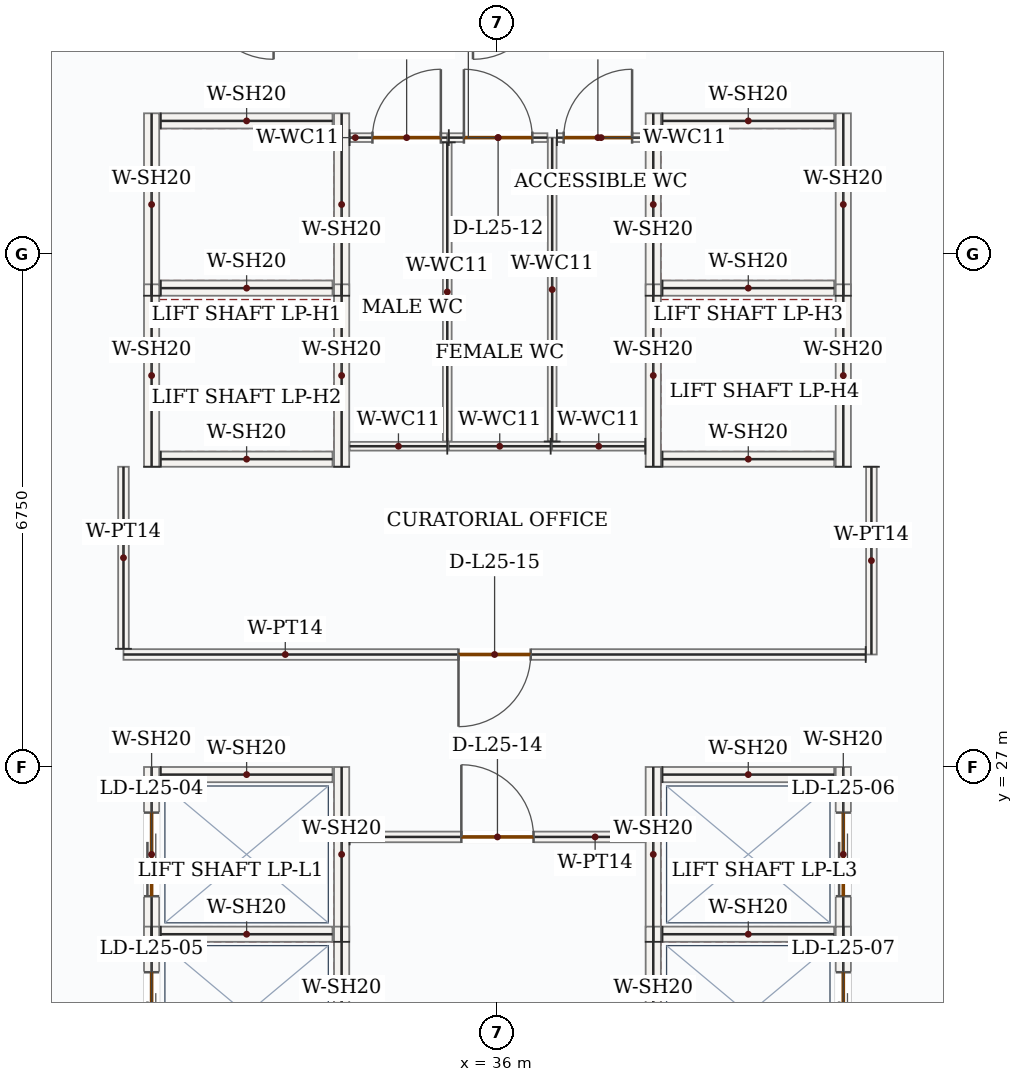
"""IFC4 building model, lengths in metres.
Left out: names, types, materials, properties, quantities, classifications, styles, units other than length and angle.
Written with IfcOpenShell. Run it as: python <this file> out.ifc"""

import sys

from ifc_helpers import new_model, si_unit, direction, frame, frame_2d, origin, place, context, subcontext, project, spatial, rectangle, extrude, source, transform, mapped, element, fill, save


model = new_model("IFC4")
c1 = context("Model", 3, precision=1e-05, world=origin(), true_north=direction((0.0, 1.0)))
c2 = subcontext(c1, "Body", "Model", "MODEL_VIEW")
j1 = project(units=[si_unit("LENGTHUNIT", "METRE"), si_unit("PLANEANGLEUNIT", "RADIAN")], contexts=[c1])
p1 = place(None, origin())
s1 = spatial("IfcSite", under=j1, at=p1, CompositionType="ELEMENT")
p2 = place(p1, origin())
s2 = spatial("IfcBuilding", under=s1, at=p2, CompositionType="ELEMENT")
p3 = place(p2, frame((0.0, 0.0, 113.1)))
s3 = spatial("IfcBuildingStorey", under=s2, at=p3, CompositionType="ELEMENT", Elevation=113.1)
m1 = source(origin(), c2, "Body", "SweptSolid", [
    extrude(rectangle(XDim=2.4, YDim=0.2, at=frame_2d((1.2, 0.0))), origin(), (0.0, 0.0, 1.0), 3.95),
])
for number, where, z_axis, x_axis in (
    (1, (31.45, 33.2, 0.0), (0.0, 0.0, 1.0), (0.0, 1.0, 0.0)),
    (2, (33.95, 33.2, 0.0), (0.0, 0.0, 1.0), (0.0, 1.0, 0.0)),
):
    element("IfcWall", number, at=place(p3, frame(where, z_axis=z_axis, x_axis=x_axis)), inside=s3, PredefinedType="SOLIDWALL", context=c2, shape_type="MappedRepresentation", body=[
        mapped(m1, transform((0.0, 0.0, 0.0), x_axis=(1.0, 0.0, 0.0), y_axis=(0.0, 1.0, 0.0), z_axis=(0.0, 0.0, 1.0), scale=1.0)),
    ])
m2 = source(origin(), c2, "Body", "SweptSolid", [
    extrude(rectangle(XDim=2.26, YDim=0.2, at=frame_2d((1.13, 0.0))), origin(), (0.0, 0.0, 1.0), 3.95),
])
for number, where, z_axis, x_axis in (
    (3, (31.57, 33.3, 0.0), (0.0, 0.0, 1.0), (1.0, 0.0, 0.0)),
    (4, (31.57, 35.5, 0.0), (0.0, 0.0, 1.0), (1.0, 0.0, 0.0)),
):
    element("IfcWall", number, at=place(p3, frame(where, z_axis=z_axis, x_axis=x_axis)), inside=s3, PredefinedType="SOLIDWALL", context=c2, shape_type="MappedRepresentation", body=[
        mapped(m2, transform((0.0, 0.0, 0.0), x_axis=(1.0, 0.0, 0.0), y_axis=(0.0, 1.0, 0.0), z_axis=(0.0, 0.0, 1.0), scale=1.0)),
    ])
for number, where, z_axis, x_axis in (
    (5, (31.45, 30.95, 0.0), (0.0, 0.0, 1.0), (0.0, 1.0, 0.0)),
    (6, (33.95, 30.95, 0.0), (0.0, 0.0, 1.0), (0.0, 1.0, 0.0)),
):
    element("IfcWall", number, at=place(p3, frame(where, z_axis=z_axis, x_axis=x_axis)), inside=s3, PredefinedType="SOLIDWALL", context=c2, shape_type="MappedRepresentation", body=[
        mapped(m1, transform((0.0, 0.0, 0.0), x_axis=(1.0, 0.0, 0.0), y_axis=(0.0, 1.0, 0.0), z_axis=(0.0, 0.0, 1.0), scale=1.0)),
    ])
p4 = place(p3, frame((31.57, 31.05, 0.0), z_axis=(0.0, 0.0, 1.0), x_axis=(1.0, 0.0, 0.0)))
e7 = element("IfcWall", 7, at=p4, inside=s3, PredefinedType="SOLIDWALL", context=c2, shape_type="MappedRepresentation", body=[
    mapped(m2, transform((0.0, 0.0, 0.0), x_axis=(1.0, 0.0, 0.0), y_axis=(0.0, 1.0, 0.0), z_axis=(0.0, 0.0, 1.0), scale=1.0)),
])
for number, where, z_axis, x_axis in (
    (8, (38.05, 33.2, 0.0), (0.0, 0.0, 1.0), (0.0, 1.0, 0.0)),
    (9, (40.55, 33.2, 0.0), (0.0, 0.0, 1.0), (0.0, 1.0, 0.0)),
):
    element("IfcWall", number, at=place(p3, frame(where, z_axis=z_axis, x_axis=x_axis)), inside=s3, PredefinedType="SOLIDWALL", context=c2, shape_type="MappedRepresentation", body=[
        mapped(m1, transform((0.0, 0.0, 0.0), x_axis=(1.0, 0.0, 0.0), y_axis=(0.0, 1.0, 0.0), z_axis=(0.0, 0.0, 1.0), scale=1.0)),
    ])
for number, where, z_axis, x_axis in (
    (10, (38.17, 33.3, 0.0), (0.0, 0.0, 1.0), (1.0, 0.0, 0.0)),
    (11, (38.17, 35.5, 0.0), (0.0, 0.0, 1.0), (1.0, 0.0, 0.0)),
):
    element("IfcWall", number, at=place(p3, frame(where, z_axis=z_axis, x_axis=x_axis)), inside=s3, PredefinedType="SOLIDWALL", context=c2, shape_type="MappedRepresentation", body=[
        mapped(m2, transform((0.0, 0.0, 0.0), x_axis=(1.0, 0.0, 0.0), y_axis=(0.0, 1.0, 0.0), z_axis=(0.0, 0.0, 1.0), scale=1.0)),
    ])
for number, where, z_axis, x_axis in (
    (12, (38.05, 30.95, 0.0), (0.0, 0.0, 1.0), (0.0, 1.0, 0.0)),
    (13, (40.55, 30.95, 0.0), (0.0, 0.0, 1.0), (0.0, 1.0, 0.0)),
):
    element("IfcWall", number, at=place(p3, frame(where, z_axis=z_axis, x_axis=x_axis)), inside=s3, PredefinedType="SOLIDWALL", context=c2, shape_type="MappedRepresentation", body=[
        mapped(m1, transform((0.0, 0.0, 0.0), x_axis=(1.0, 0.0, 0.0), y_axis=(0.0, 1.0, 0.0), z_axis=(0.0, 0.0, 1.0), scale=1.0)),
    ])
p5 = place(p3, frame((38.17, 31.05, 0.0), z_axis=(0.0, 0.0, 1.0), x_axis=(1.0, 0.0, 0.0)))
e14 = element("IfcWall", 14, at=p5, inside=s3, PredefinedType="SOLIDWALL", context=c2, shape_type="MappedRepresentation", body=[
    mapped(m2, transform((0.0, 0.0, 0.0), x_axis=(1.0, 0.0, 0.0), y_axis=(0.0, 1.0, 0.0), z_axis=(0.0, 0.0, 1.0), scale=1.0)),
])
p6 = place(p3, frame((31.45, 24.7, 0.0), z_axis=(0.0, 0.0, 1.0), x_axis=(0.0, 1.0, 0.0)))
e15 = element("IfcWall", 15, at=p6, inside=s3, PredefinedType="SOLIDWALL", context=c2, shape_type="SweptSolid", body=[
    extrude(rectangle(XDim=2.3, YDim=0.2, at=frame_2d((1.15, 0.0))), origin(), (0.0, 0.0, 1.0), 3.95),
])
p7 = place(p6, frame((0.6, 0.0, 0.0)))
e16 = element("IfcOpeningElement", 16, at=p7, cuts=e15, PredefinedType="OPENING", context=c2, shape_type="SweptSolid", body=[
    extrude(rectangle(XDim=1.1, YDim=2.15, at=frame_2d((0.55, 1.075))), frame((0.0, 0.11, 0.0), z_axis=(0.0, -1.0, 0.0), x_axis=(1.0, 0.0, 0.0)), (0.0, 0.0, 1.0), 0.22),
])
m3 = source(origin(), c2, "Body", "SweptSolid", [
    extrude(rectangle(XDim=2.3, YDim=0.2, at=frame_2d((1.15, 0.0))), origin(), (0.0, 0.0, 1.0), 3.95),
])
p8 = place(p3, frame((33.95, 24.7, 0.0), z_axis=(0.0, 0.0, 1.0), x_axis=(0.0, 1.0, 0.0)))
e17 = element("IfcWall", 17, at=p8, inside=s3, PredefinedType="SOLIDWALL", context=c2, shape_type="MappedRepresentation", body=[
    mapped(m3, transform((0.0, 0.0, 0.0), x_axis=(1.0, 0.0, 0.0), y_axis=(0.0, 1.0, 0.0), z_axis=(0.0, 0.0, 1.0), scale=1.0)),
])
for number, where, z_axis, x_axis in (
    (18, (31.57, 24.8, 0.0), (0.0, 0.0, 1.0), (1.0, 0.0, 0.0)),
    (19, (31.57, 26.9, 0.0), (0.0, 0.0, 1.0), (1.0, 0.0, 0.0)),
):
    element("IfcWall", number, at=place(p3, frame(where, z_axis=z_axis, x_axis=x_axis)), inside=s3, PredefinedType="SOLIDWALL", context=c2, shape_type="MappedRepresentation", body=[
        mapped(m2, transform((0.0, 0.0, 0.0), x_axis=(1.0, 0.0, 0.0), y_axis=(0.0, 1.0, 0.0), z_axis=(0.0, 0.0, 1.0), scale=1.0)),
    ])
p9 = place(p3, frame((31.45, 22.6, 0.0), z_axis=(0.0, 0.0, 1.0), x_axis=(0.0, 1.0, 0.0)))
e20 = element("IfcWall", 20, at=p9, inside=s3, PredefinedType="SOLIDWALL", context=c2, shape_type="SweptSolid", body=[
    extrude(rectangle(XDim=2.3, YDim=0.2, at=frame_2d((1.15, 0.0))), origin(), (0.0, 0.0, 1.0), 3.95),
])
p10 = place(p9, frame((0.6, 0.0, 0.0)))
e21 = element("IfcOpeningElement", 21, at=p10, cuts=e20, PredefinedType="OPENING", context=c2, shape_type="SweptSolid", body=[
    extrude(rectangle(XDim=1.1, YDim=2.15, at=frame_2d((0.55, 1.075))), frame((0.0, 0.11, 0.0), z_axis=(0.0, -1.0, 0.0), x_axis=(1.0, 0.0, 0.0)), (0.0, 0.0, 1.0), 0.22),
])
m4 = source(origin(), c2, "Body", "SweptSolid", [
    extrude(rectangle(XDim=2.3, YDim=0.2, at=frame_2d((1.15, 0.0))), origin(), (0.0, 0.0, 1.0), 3.95),
])
p11 = place(p3, frame((33.95, 22.6, 0.0), z_axis=(0.0, 0.0, 1.0), x_axis=(0.0, 1.0, 0.0)))
e22 = element("IfcWall", 22, at=p11, inside=s3, PredefinedType="SOLIDWALL", context=c2, shape_type="MappedRepresentation", body=[
    mapped(m4, transform((0.0, 0.0, 0.0), x_axis=(1.0, 0.0, 0.0), y_axis=(0.0, 1.0, 0.0), z_axis=(0.0, 0.0, 1.0), scale=1.0)),
])
p12 = place(p3, frame((38.05, 24.7, 0.0), z_axis=(0.0, 0.0, 1.0), x_axis=(0.0, 1.0, 0.0)))
e23 = element("IfcWall", 23, at=p12, inside=s3, PredefinedType="SOLIDWALL", context=c2, shape_type="MappedRepresentation", body=[
    mapped(m3, transform((0.0, 0.0, 0.0), x_axis=(1.0, 0.0, 0.0), y_axis=(0.0, 1.0, 0.0), z_axis=(0.0, 0.0, 1.0), scale=1.0)),
])
p13 = place(p3, frame((40.55, 24.7, 0.0), z_axis=(0.0, 0.0, 1.0), x_axis=(0.0, 1.0, 0.0)))
e24 = element("IfcWall", 24, at=p13, inside=s3, PredefinedType="SOLIDWALL", context=c2, shape_type="SweptSolid", body=[
    extrude(rectangle(XDim=2.3, YDim=0.2, at=frame_2d((1.15, 0.0))), origin(), (0.0, 0.0, 1.0), 3.95),
])
p14 = place(p13, frame((0.6, 0.0, 0.0)))
e25 = element("IfcOpeningElement", 25, at=p14, cuts=e24, PredefinedType="OPENING", context=c2, shape_type="SweptSolid", body=[
    extrude(rectangle(XDim=1.1, YDim=2.15, at=frame_2d((0.55, 1.075))), frame((0.0, 0.11, 0.0), z_axis=(0.0, -1.0, 0.0), x_axis=(1.0, 0.0, 0.0)), (0.0, 0.0, 1.0), 0.22),
])
for number, where, z_axis, x_axis in (
    (26, (38.17, 24.8, 0.0), (0.0, 0.0, 1.0), (1.0, 0.0, 0.0)),
    (27, (38.17, 26.9, 0.0), (0.0, 0.0, 1.0), (1.0, 0.0, 0.0)),
):
    element("IfcWall", number, at=place(p3, frame(where, z_axis=z_axis, x_axis=x_axis)), inside=s3, PredefinedType="SOLIDWALL", context=c2, shape_type="MappedRepresentation", body=[
        mapped(m2, transform((0.0, 0.0, 0.0), x_axis=(1.0, 0.0, 0.0), y_axis=(0.0, 1.0, 0.0), z_axis=(0.0, 0.0, 1.0), scale=1.0)),
    ])
p15 = place(p3, frame((38.05, 22.6, 0.0), z_axis=(0.0, 0.0, 1.0), x_axis=(0.0, 1.0, 0.0)))
e28 = element("IfcWall", 28, at=p15, inside=s3, PredefinedType="SOLIDWALL", context=c2, shape_type="MappedRepresentation", body=[
    mapped(m4, transform((0.0, 0.0, 0.0), x_axis=(1.0, 0.0, 0.0), y_axis=(0.0, 1.0, 0.0), z_axis=(0.0, 0.0, 1.0), scale=1.0)),
])
p16 = place(p3, frame((40.55, 22.6, 0.0), z_axis=(0.0, 0.0, 1.0), x_axis=(0.0, 1.0, 0.0)))
e29 = element("IfcWall", 29, at=p16, inside=s3, PredefinedType="SOLIDWALL", context=c2, shape_type="SweptSolid", body=[
    extrude(rectangle(XDim=2.3, YDim=0.2, at=frame_2d((1.15, 0.0))), origin(), (0.0, 0.0, 1.0), 3.95),
])
p17 = place(p16, frame((0.6, 0.0, 0.0)))
e30 = element("IfcOpeningElement", 30, at=p17, cuts=e29, PredefinedType="OPENING", context=c2, shape_type="SweptSolid", body=[
    extrude(rectangle(XDim=1.1, YDim=2.15, at=frame_2d((0.55, 1.075))), frame((0.0, 0.11, 0.0), z_axis=(0.0, -1.0, 0.0), x_axis=(1.0, 0.0, 0.0)), (0.0, 0.0, 1.0), 0.22),
])
m5 = source(origin(), c2, "Body", "SweptSolid", [
    extrude(rectangle(XDim=1.225, YDim=0.115, at=frame_2d((0.613, 0.0))), origin(), (0.0, 0.0, 1.0), 3.95),
])
p18 = place(p3, frame((37.945, 31.22, 0.0), z_axis=(0.0, 0.0, 1.0), x_axis=(-1.0, 0.0, 0.0)))
e31 = element("IfcWall", 31, at=p18, inside=s3, PredefinedType="PARTITIONING", context=c2, shape_type="MappedRepresentation", body=[
    mapped(m5, transform((0.0, 0.0, 0.0), x_axis=(1.0, 0.0, 0.0), y_axis=(0.0, 1.0, 0.0), z_axis=(0.0, 0.0, 1.0), scale=1.0)),
])
m6 = source(origin(), c2, "Body", "SweptSolid", [
    extrude(rectangle(XDim=3.998, YDim=0.115, at=frame_2d((1.999, 0.0))), origin(), (0.0, 0.0, 1.0), 3.95),
])
p19 = place(p3, frame((36.72, 31.282, 0.0), z_axis=(0.0, 0.0, 1.0), x_axis=(0.0, 1.0, 0.0)))
e32 = element("IfcWall", 32, at=p19, inside=s3, PredefinedType="PARTITIONING", context=c2, shape_type="MappedRepresentation", body=[
    mapped(m6, transform((0.0, 0.0, 0.0), x_axis=(1.0, 0.0, 0.0), y_axis=(0.0, 1.0, 0.0), z_axis=(0.0, 0.0, 1.0), scale=1.0)),
])
p20 = place(p3, frame((36.782, 35.28, 0.0), z_axis=(0.0, 0.0, 1.0), x_axis=(1.0, 0.0, 0.0)))
e33 = element("IfcWall", 33, at=p20, inside=s3, PredefinedType="PARTITIONING", context=c2, shape_type="SweptSolid", body=[
    extrude(rectangle(XDim=1.163, YDim=0.115, at=frame_2d((0.581, 0.0))), origin(), (0.0, 0.0, 1.0), 3.95),
])
p21 = place(p20, frame((0.089, 0.0, 0.0)))
e34 = element("IfcOpeningElement", 34, at=p21, cuts=e33, PredefinedType="OPENING", context=c2, shape_type="SweptSolid", body=[
    extrude(rectangle(XDim=0.9, YDim=2.1, at=frame_2d((0.45, 1.05))), frame((0.0, 0.067, 0.0), z_axis=(0.0, -1.0, 0.0), x_axis=(1.0, 0.0, 0.0)), (0.0, 0.0, 1.0), 0.135),
])
m7 = source(origin(), c2, "Body", "SweptSolid", [
    extrude(rectangle(XDim=1.285, YDim=0.115, at=frame_2d((0.643, 0.0))), origin(), (0.0, 0.0, 1.0), 3.95),
])
p22 = place(p3, frame((35.34, 31.22, 0.0), z_axis=(0.0, 0.0, 1.0), x_axis=(-1.0, 0.0, 0.0)))
e35 = element("IfcWall", 35, at=p22, inside=s3, PredefinedType="PARTITIONING", context=c2, shape_type="MappedRepresentation", body=[
    mapped(m7, transform((0.0, 0.0, 0.0), x_axis=(1.0, 0.0, 0.0), y_axis=(0.0, 1.0, 0.0), z_axis=(0.0, 0.0, 1.0), scale=1.0)),
])
p23 = place(p3, frame((34.055, 35.28, 0.0), z_axis=(0.0, 0.0, 1.0), x_axis=(1.0, 0.0, 0.0)))
e36 = element("IfcWall", 36, at=p23, inside=s3, PredefinedType="PARTITIONING", context=c2, shape_type="SweptSolid", body=[
    extrude(rectangle(XDim=1.285, YDim=0.115, at=frame_2d((0.643, 0.0))), origin(), (0.0, 0.0, 1.0), 3.95),
])
p24 = place(p23, frame((0.3, 0.0, 0.0)))
e37 = element("IfcOpeningElement", 37, at=p24, cuts=e36, PredefinedType="OPENING", context=c2, shape_type="SweptSolid", body=[
    extrude(rectangle(XDim=0.9, YDim=2.1, at=frame_2d((0.45, 1.05))), frame((0.0, 0.067, 0.0), z_axis=(0.0, -1.0, 0.0), x_axis=(1.0, 0.0, 0.0)), (0.0, 0.0, 1.0), 0.135),
])
m8 = source(origin(), c2, "Body", "SweptSolid", [
    extrude(rectangle(XDim=3.935, YDim=0.115, at=frame_2d((1.968, 0.0))), origin(), (0.0, 0.0, 1.0), 3.95),
])
p25 = place(p3, frame((35.34, 35.218, 0.0), z_axis=(0.0, 0.0, 1.0), x_axis=(0.0, -1.0, 0.0)))
e38 = element("IfcWall", 38, at=p25, inside=s3, PredefinedType="PARTITIONING", context=c2, shape_type="MappedRepresentation", body=[
    mapped(m8, transform((0.0, 0.0, 0.0), x_axis=(1.0, 0.0, 0.0), y_axis=(0.0, 1.0, 0.0), z_axis=(0.0, 0.0, 1.0), scale=1.0)),
])
m9 = source(origin(), c2, "Body", "SweptSolid", [
    extrude(rectangle(XDim=1.34, YDim=0.115, at=frame_2d((0.67, 0.0))), origin(), (0.0, 0.0, 1.0), 3.95),
])
p26 = place(p3, frame((36.7, 31.22, 0.0), z_axis=(0.0, 0.0, 1.0), x_axis=(-1.0, 0.0, 0.0)))
e39 = element("IfcWall", 39, at=p26, inside=s3, PredefinedType="PARTITIONING", context=c2, shape_type="MappedRepresentation", body=[
    mapped(m9, transform((0.0, 0.0, 0.0), x_axis=(1.0, 0.0, 0.0), y_axis=(0.0, 1.0, 0.0), z_axis=(0.0, 0.0, 1.0), scale=1.0)),
])
p27 = place(p3, frame((35.36, 35.28, 0.0), z_axis=(0.0, 0.0, 1.0), x_axis=(1.0, 0.0, 0.0)))
e40 = element("IfcWall", 40, at=p27, inside=s3, PredefinedType="PARTITIONING", context=c2, shape_type="SweptSolid", body=[
    extrude(rectangle(XDim=1.297, YDim=0.115, at=frame_2d((0.649, 0.0))), origin(), (0.0, 0.0, 1.0), 3.95),
])
p28 = place(p27, frame((0.199, 0.0, 0.0)))
e41 = element("IfcOpeningElement", 41, at=p28, cuts=e40, PredefinedType="OPENING", context=c2, shape_type="SweptSolid", body=[
    extrude(rectangle(XDim=0.9, YDim=2.1, at=frame_2d((0.45, 1.05))), frame((0.0, 0.067, 0.0), z_axis=(0.0, -1.0, 0.0), x_axis=(1.0, 0.0, 0.0)), (0.0, 0.0, 1.0), 0.135),
])
p29 = place(p3, frame((34.055, 26.08, 0.0), z_axis=(0.0, 0.0, 1.0), x_axis=(1.0, 0.0, 0.0)))
e42 = element("IfcWall", 42, at=p29, inside=s3, PredefinedType="PARTITIONING", context=c2, shape_type="SweptSolid", body=[
    extrude(rectangle(XDim=3.89, YDim=0.14, at=frame_2d((1.945, 0.0))), origin(), (0.0, 0.0, 1.0), 3.95),
])
p30 = place(p29, frame((1.47, 0.0, 0.0)))
e43 = element("IfcOpeningElement", 43, at=p30, cuts=e42, PredefinedType="OPENING", context=c2, shape_type="SweptSolid", body=[
    extrude(rectangle(XDim=0.95, YDim=2.15, at=frame_2d((0.475, 1.075))), frame((0.0, 0.08, 0.0), z_axis=(0.0, -1.0, 0.0), x_axis=(1.0, 0.0, 0.0)), (0.0, 0.0, 1.0), 0.16),
])
m10 = source(origin(), c2, "Body", "SweptSolid", [
    extrude(rectangle(XDim=2.47, YDim=0.14, at=frame_2d((1.235, 0.0))), origin(), (0.0, 0.0, 1.0), 3.95),
])
p31 = place(p3, frame((40.92, 30.95, 0.0), z_axis=(0.0, 0.0, 1.0), x_axis=(0.0, -1.0, 0.0)))
e44 = element("IfcWall", 44, at=p31, inside=s3, PredefinedType="PARTITIONING", context=c2, shape_type="MappedRepresentation", body=[
    mapped(m10, transform((0.0, 0.0, 0.0), x_axis=(1.0, 0.0, 0.0), y_axis=(0.0, 1.0, 0.0), z_axis=(0.0, 0.0, 1.0), scale=1.0)),
])
p32 = place(p3, frame((40.845, 28.48, 0.0), z_axis=(0.0, 0.0, 1.0), x_axis=(-1.0, 0.0, 0.0)))
e45 = element("IfcWall", 45, at=p32, inside=s3, PredefinedType="PARTITIONING", context=c2, shape_type="SweptSolid", body=[
    extrude(rectangle(XDim=9.765, YDim=0.14, at=frame_2d((4.882, 0.0))), origin(), (0.0, 0.0, 1.0), 3.95),
])
p33 = place(p32, frame((4.407, 0.0, 0.0)))
e46 = element("IfcOpeningElement", 46, at=p33, cuts=e45, PredefinedType="OPENING", context=c2, shape_type="SweptSolid", body=[
    extrude(rectangle(XDim=0.95, YDim=2.15, at=frame_2d((0.475, 1.075))), frame((0.0, 0.08, 0.0), z_axis=(0.0, -1.0, 0.0), x_axis=(1.0, 0.0, 0.0)), (0.0, 0.0, 1.0), 0.16),
])
m11 = source(origin(), c2, "Body", "SweptSolid", [
    extrude(rectangle(XDim=2.395, YDim=0.14, at=frame_2d((1.198, 0.0))), origin(), (0.0, 0.0, 1.0), 3.95),
])
p34 = place(p3, frame((31.08, 28.555, 0.0), z_axis=(0.0, 0.0, 1.0), x_axis=(0.0, 1.0, 0.0)))
e47 = element("IfcWall", 47, at=p34, inside=s3, PredefinedType="PARTITIONING", context=c2, shape_type="MappedRepresentation", body=[
    mapped(m11, transform((0.0, 0.0, 0.0), x_axis=(1.0, 0.0, 0.0), y_axis=(0.0, 1.0, 0.0), z_axis=(0.0, 0.0, 1.0), scale=1.0)),
])
m12 = source(origin(), c2, "Body", "SweptSolid", [
    extrude(rectangle(XDim=1.1, YDim=2.15, at=frame_2d((0.55, 1.075))), frame((0.0, 0.025, 0.0), z_axis=(0.0, -1.0, 0.0), x_axis=(1.0, 0.0, 0.0)), (0.0, 0.0, 1.0), 0.05),
])
p35 = place(p7, origin())
e48 = element("IfcDoor", 48, at=p35, inside=s3, OperationType="DOUBLE_DOOR_SLIDING", PredefinedType="DOOR", context=c2, shape_type="MappedRepresentation", body=[
    mapped(m12, transform((0.0, 0.0, 0.0), x_axis=(1.0, 0.0, 0.0), y_axis=(0.0, 1.0, 0.0), z_axis=(0.0, 0.0, 1.0), scale=1.0)),
])
fill(e16, e48)
p36 = place(p10, origin())
e49 = element("IfcDoor", 49, at=p36, inside=s3, OperationType="DOUBLE_DOOR_SLIDING", PredefinedType="DOOR", context=c2, shape_type="MappedRepresentation", body=[
    mapped(m12, transform((0.0, 0.0, 0.0), x_axis=(1.0, 0.0, 0.0), y_axis=(0.0, 1.0, 0.0), z_axis=(0.0, 0.0, 1.0), scale=1.0)),
])
fill(e21, e49)
p37 = place(p14, origin())
e50 = element("IfcDoor", 50, at=p37, inside=s3, OperationType="DOUBLE_DOOR_SLIDING", PredefinedType="DOOR", context=c2, shape_type="MappedRepresentation", body=[
    mapped(m12, transform((0.0, 0.0, 0.0), x_axis=(1.0, 0.0, 0.0), y_axis=(0.0, 1.0, 0.0), z_axis=(0.0, 0.0, 1.0), scale=1.0)),
])
fill(e25, e50)
p38 = place(p17, origin())
e51 = element("IfcDoor", 51, at=p38, inside=s3, OperationType="DOUBLE_DOOR_SLIDING", PredefinedType="DOOR", context=c2, shape_type="MappedRepresentation", body=[
    mapped(m12, transform((0.0, 0.0, 0.0), x_axis=(1.0, 0.0, 0.0), y_axis=(0.0, 1.0, 0.0), z_axis=(0.0, 0.0, 1.0), scale=1.0)),
])
fill(e30, e51)
m13 = source(origin(), c2, "Body", "SweptSolid", [
    extrude(rectangle(XDim=0.9, YDim=2.1, at=frame_2d((0.45, 1.05))), frame((0.0, 0.025, 0.0), z_axis=(0.0, -1.0, 0.0), x_axis=(1.0, 0.0, 0.0)), (0.0, 0.0, 1.0), 0.05),
])
p39 = place(p24, origin())
e52 = element("IfcDoor", 52, at=p39, inside=s3, OperationType="SINGLE_SWING_RIGHT", PredefinedType="DOOR", context=c2, shape_type="MappedRepresentation", body=[
    mapped(m13, transform((0.0, 0.0, 0.0), x_axis=(1.0, 0.0, 0.0), y_axis=(0.0, 1.0, 0.0), z_axis=(0.0, 0.0, 1.0), scale=1.0)),
])
fill(e37, e52)
p40 = place(p28, origin())
e53 = element("IfcDoor", 53, at=p40, inside=s3, OperationType="SINGLE_SWING_LEFT", PredefinedType="DOOR", context=c2, shape_type="MappedRepresentation", body=[
    mapped(m13, transform((0.0, 0.0, 0.0), x_axis=(1.0, 0.0, 0.0), y_axis=(0.0, 1.0, 0.0), z_axis=(0.0, 0.0, 1.0), scale=1.0)),
])
fill(e41, e53)
p41 = place(p21, origin())
e54 = element("IfcDoor", 54, at=p41, inside=s3, OperationType="SINGLE_SWING_RIGHT", PredefinedType="DOOR", context=c2, shape_type="MappedRepresentation", body=[
    mapped(m13, transform((0.0, 0.0, 0.0), x_axis=(1.0, 0.0, 0.0), y_axis=(0.0, 1.0, 0.0), z_axis=(0.0, 0.0, 1.0), scale=1.0)),
])
fill(e34, e54)
m14 = source(origin(), c2, "Body", "SweptSolid", [
    extrude(rectangle(XDim=0.95, YDim=2.15, at=frame_2d((0.475, 1.075))), frame((0.0, 0.025, 0.0), z_axis=(0.0, -1.0, 0.0), x_axis=(1.0, 0.0, 0.0)), (0.0, 0.0, 1.0), 0.05),
])
p42 = place(p30, origin())
e55 = element("IfcDoor", 55, at=p42, inside=s3, OperationType="SINGLE_SWING_LEFT", PredefinedType="DOOR", context=c2, shape_type="MappedRepresentation", body=[
    mapped(m14, transform((0.0, 0.0, 0.0), x_axis=(1.0, 0.0, 0.0), y_axis=(0.0, 1.0, 0.0), z_axis=(0.0, 0.0, 1.0), scale=1.0)),
])
fill(e43, e55)
p43 = place(p33, origin())
e56 = element("IfcDoor", 56, at=p43, inside=s3, OperationType="SINGLE_SWING_RIGHT", PredefinedType="DOOR", context=c2, shape_type="MappedRepresentation", body=[
    mapped(m14, transform((0.0, 0.0, 0.0), x_axis=(1.0, 0.0, 0.0), y_axis=(0.0, 1.0, 0.0), z_axis=(0.0, 0.0, 1.0), scale=1.0)),
])
fill(e46, e56)
save(model, sys.argv[1])
